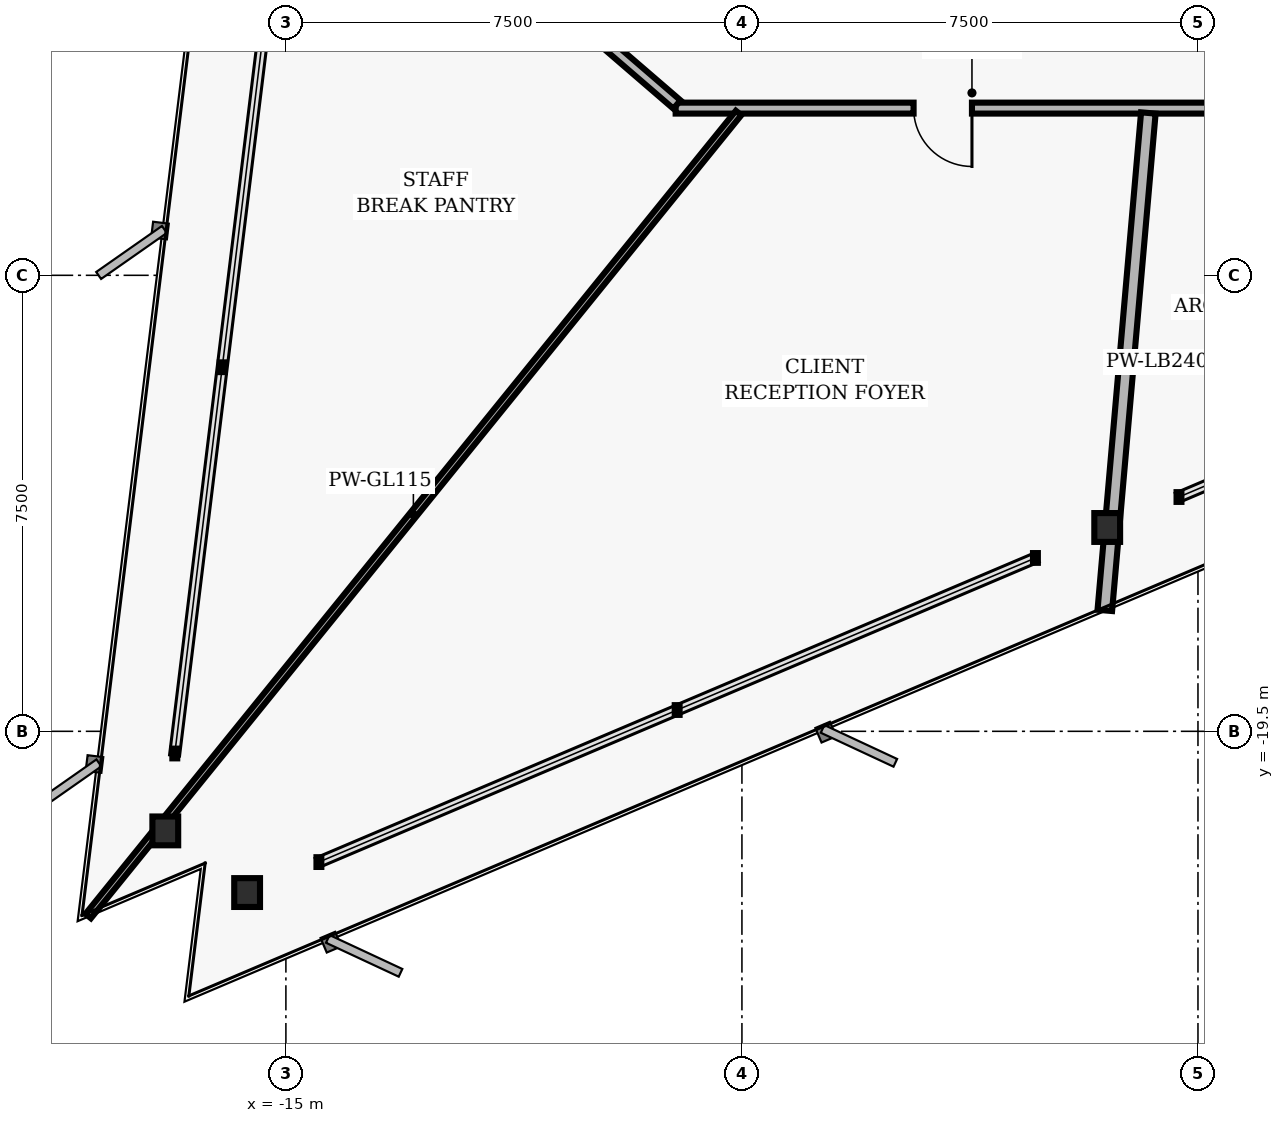
"""IFC4 building model, lengths in metres.
Left out: names, types, materials, properties, quantities, classifications, styles, units other than length and angle.
Written with IfcOpenShell. Run it as: python <this file> out.ifc"""

import sys

from ifc_helpers import new_model, si_unit, direction, frame, frame_2d, origin, origin_2d, place, context, subcontext, project, spatial, rectangle, i_section, extrude, element, fill, save


model = new_model("IFC4")
c1 = context("Model", 3, precision=1e-05, world=origin(), true_north=direction((0.0, 1.0)))
c2 = subcontext(c1, "Body", "Model", "MODEL_VIEW")
j1 = project(units=[si_unit("LENGTHUNIT", "METRE"), si_unit("PLANEANGLEUNIT", "RADIAN")], contexts=[c1])
p1 = place(None, origin())
s1 = spatial("IfcSite", under=j1, at=p1, CompositionType="ELEMENT")
p2 = place(p1, origin())
s2 = spatial("IfcBuilding", under=s1, at=p2, CompositionType="ELEMENT")
p3 = place(p2, frame((0.0, 0.0, 59.68)))
s3 = spatial("IfcBuildingStorey", under=s2, at=p3, CompositionType="ELEMENT", Elevation=59.68)
for number, where, z_axis, x_axis in (
    (1, (-16.983, -21.138, 0.0), (0.0, 0.0, 1.0), (1.0, 0.0, 0.0)),
    (2, (-15.638, -22.152, 0.0), (0.0, 0.0, 1.0), (1.0, 0.0, 0.0)),
    (3, (-1.493, -16.148, 0.0), (0.0, 0.0, 1.0), (1.0, 0.0, 0.0)),
):
    element("IfcColumn", number, at=place(p3, frame(where, z_axis=z_axis, x_axis=x_axis)), inside=s3, PredefinedType="COLUMN", context=c2, shape_type="SweptSolid", body=[
        extrude(i_section(OverallWidth=0.424, OverallDepth=0.474, WebThickness=0.048, FlangeThickness=0.077, FilletRadius=0.025, at=origin_2d()), origin(), (0.0, 0.0, 1.0), 3.36),
    ])
p4 = place(p3, frame((8.41, -9.25, 0.0), z_axis=(0.0, 0.0, 1.0), x_axis=(-1.0, 0.0, 0.0)))
e4 = element("IfcWall", 4, at=p4, inside=s3, PredefinedType="PARTITIONING", context=c2, shape_type="SweptSolid", body=[
    extrude(rectangle(XDim=17.0, YDim=0.18, at=frame_2d((8.5, 0.0))), origin(), (0.0, 0.0, 1.0), 2.587),
])
p5 = place(p4, frame((12.127, 0.0, 0.0)))
e5 = element("IfcOpeningElement", 5, at=p5, cuts=e4, PredefinedType="OPENING", context=c2, shape_type="SweptSolid", body=[
    extrude(rectangle(XDim=0.96, YDim=2.02, at=frame_2d((0.48, 1.01))), frame((0.0, 0.1, 0.0), z_axis=(0.0, -1.0, 0.0), x_axis=(1.0, 0.0, 0.0)), (0.0, 0.0, 1.0), 0.2),
])
p6 = place(p4, frame((5.75, 0.0, 0.0)))
e6 = element("IfcOpeningElement", 6, at=p6, cuts=e4, PredefinedType="OPENING", context=c2, shape_type="SweptSolid", body=[
    extrude(rectangle(XDim=0.96, YDim=2.02, at=frame_2d((0.48, 1.01))), frame((0.0, 0.1, 0.0), z_axis=(0.0, -1.0, 0.0), x_axis=(1.0, 0.0, 0.0)), (0.0, 0.0, 1.0), 0.2),
])
p7 = place(p3, frame((-8.568, -9.191, 0.0), z_axis=(0.0, 0.0, 1.0), x_axis=(-0.757556899173, 0.652769135694, 0.0)))
e7 = element("IfcWall", 7, at=p7, inside=s3, PredefinedType="PARTITIONING", context=c2, shape_type="SweptSolid", body=[
    extrude(rectangle(XDim=6.204, YDim=0.18, at=frame_2d((3.102, 0.0))), origin(), (0.0, 0.0, 1.0), 3.073),
])
p8 = place(p7, frame((2.622, 0.0, 0.0)))
e8 = element("IfcOpeningElement", 8, at=p8, cuts=e7, PredefinedType="OPENING", context=c2, shape_type="SweptSolid", body=[
    extrude(rectangle(XDim=0.96, YDim=2.02, at=frame_2d((0.48, 1.01))), frame((0.0, 0.1, 0.0), z_axis=(0.0, -1.0, 0.0), x_axis=(1.0, 0.0, 0.0)), (0.0, 0.0, 1.0), 0.2),
])
p9 = place(p3, frame((-7.555, -9.33, 0.0), z_axis=(0.0, 0.0, 1.0), x_axis=(-0.629320948329, -0.777145510181, 0.0)))
e9 = element("IfcWall", 9, at=p9, inside=s3, PredefinedType="MOVABLE", context=c2, shape_type="SweptSolid", body=[
    extrude(rectangle(XDim=16.996, YDim=0.115, at=frame_2d((8.498, 0.0))), origin(), (0.0, 0.0, 1.0), 2.358),
])
p10 = place(p3, frame((-0.816, -9.33, 0.0), z_axis=(0.0, 0.0, 1.0), x_axis=(-0.087131179551, -0.996196846788, 0.0)))
e10 = element("IfcWall", 10, at=p10, inside=s3, PredefinedType="PARTITIONING", context=c2, shape_type="SweptSolid", body=[
    extrude(rectangle(XDim=8.213, YDim=0.24, at=frame_2d((4.106, 0.0))), origin(), (0.0, 0.0, 1.0), 3.073),
])
p11 = place(p5, origin())
e11 = element("IfcDoor", 11, at=p11, inside=s3, OperationType="SINGLE_SWING_LEFT", PredefinedType="DOOR", context=c2, shape_type="SweptSolid", body=[
    extrude(rectangle(XDim=0.96, YDim=2.02, at=frame_2d((0.48, 1.01))), frame((0.0, 0.025, 0.0), z_axis=(0.0, -1.0, 0.0), x_axis=(1.0, 0.0, 0.0)), (0.0, 0.0, 1.0), 0.05),
])
fill(e5, e11)
save(model, sys.argv[1])
